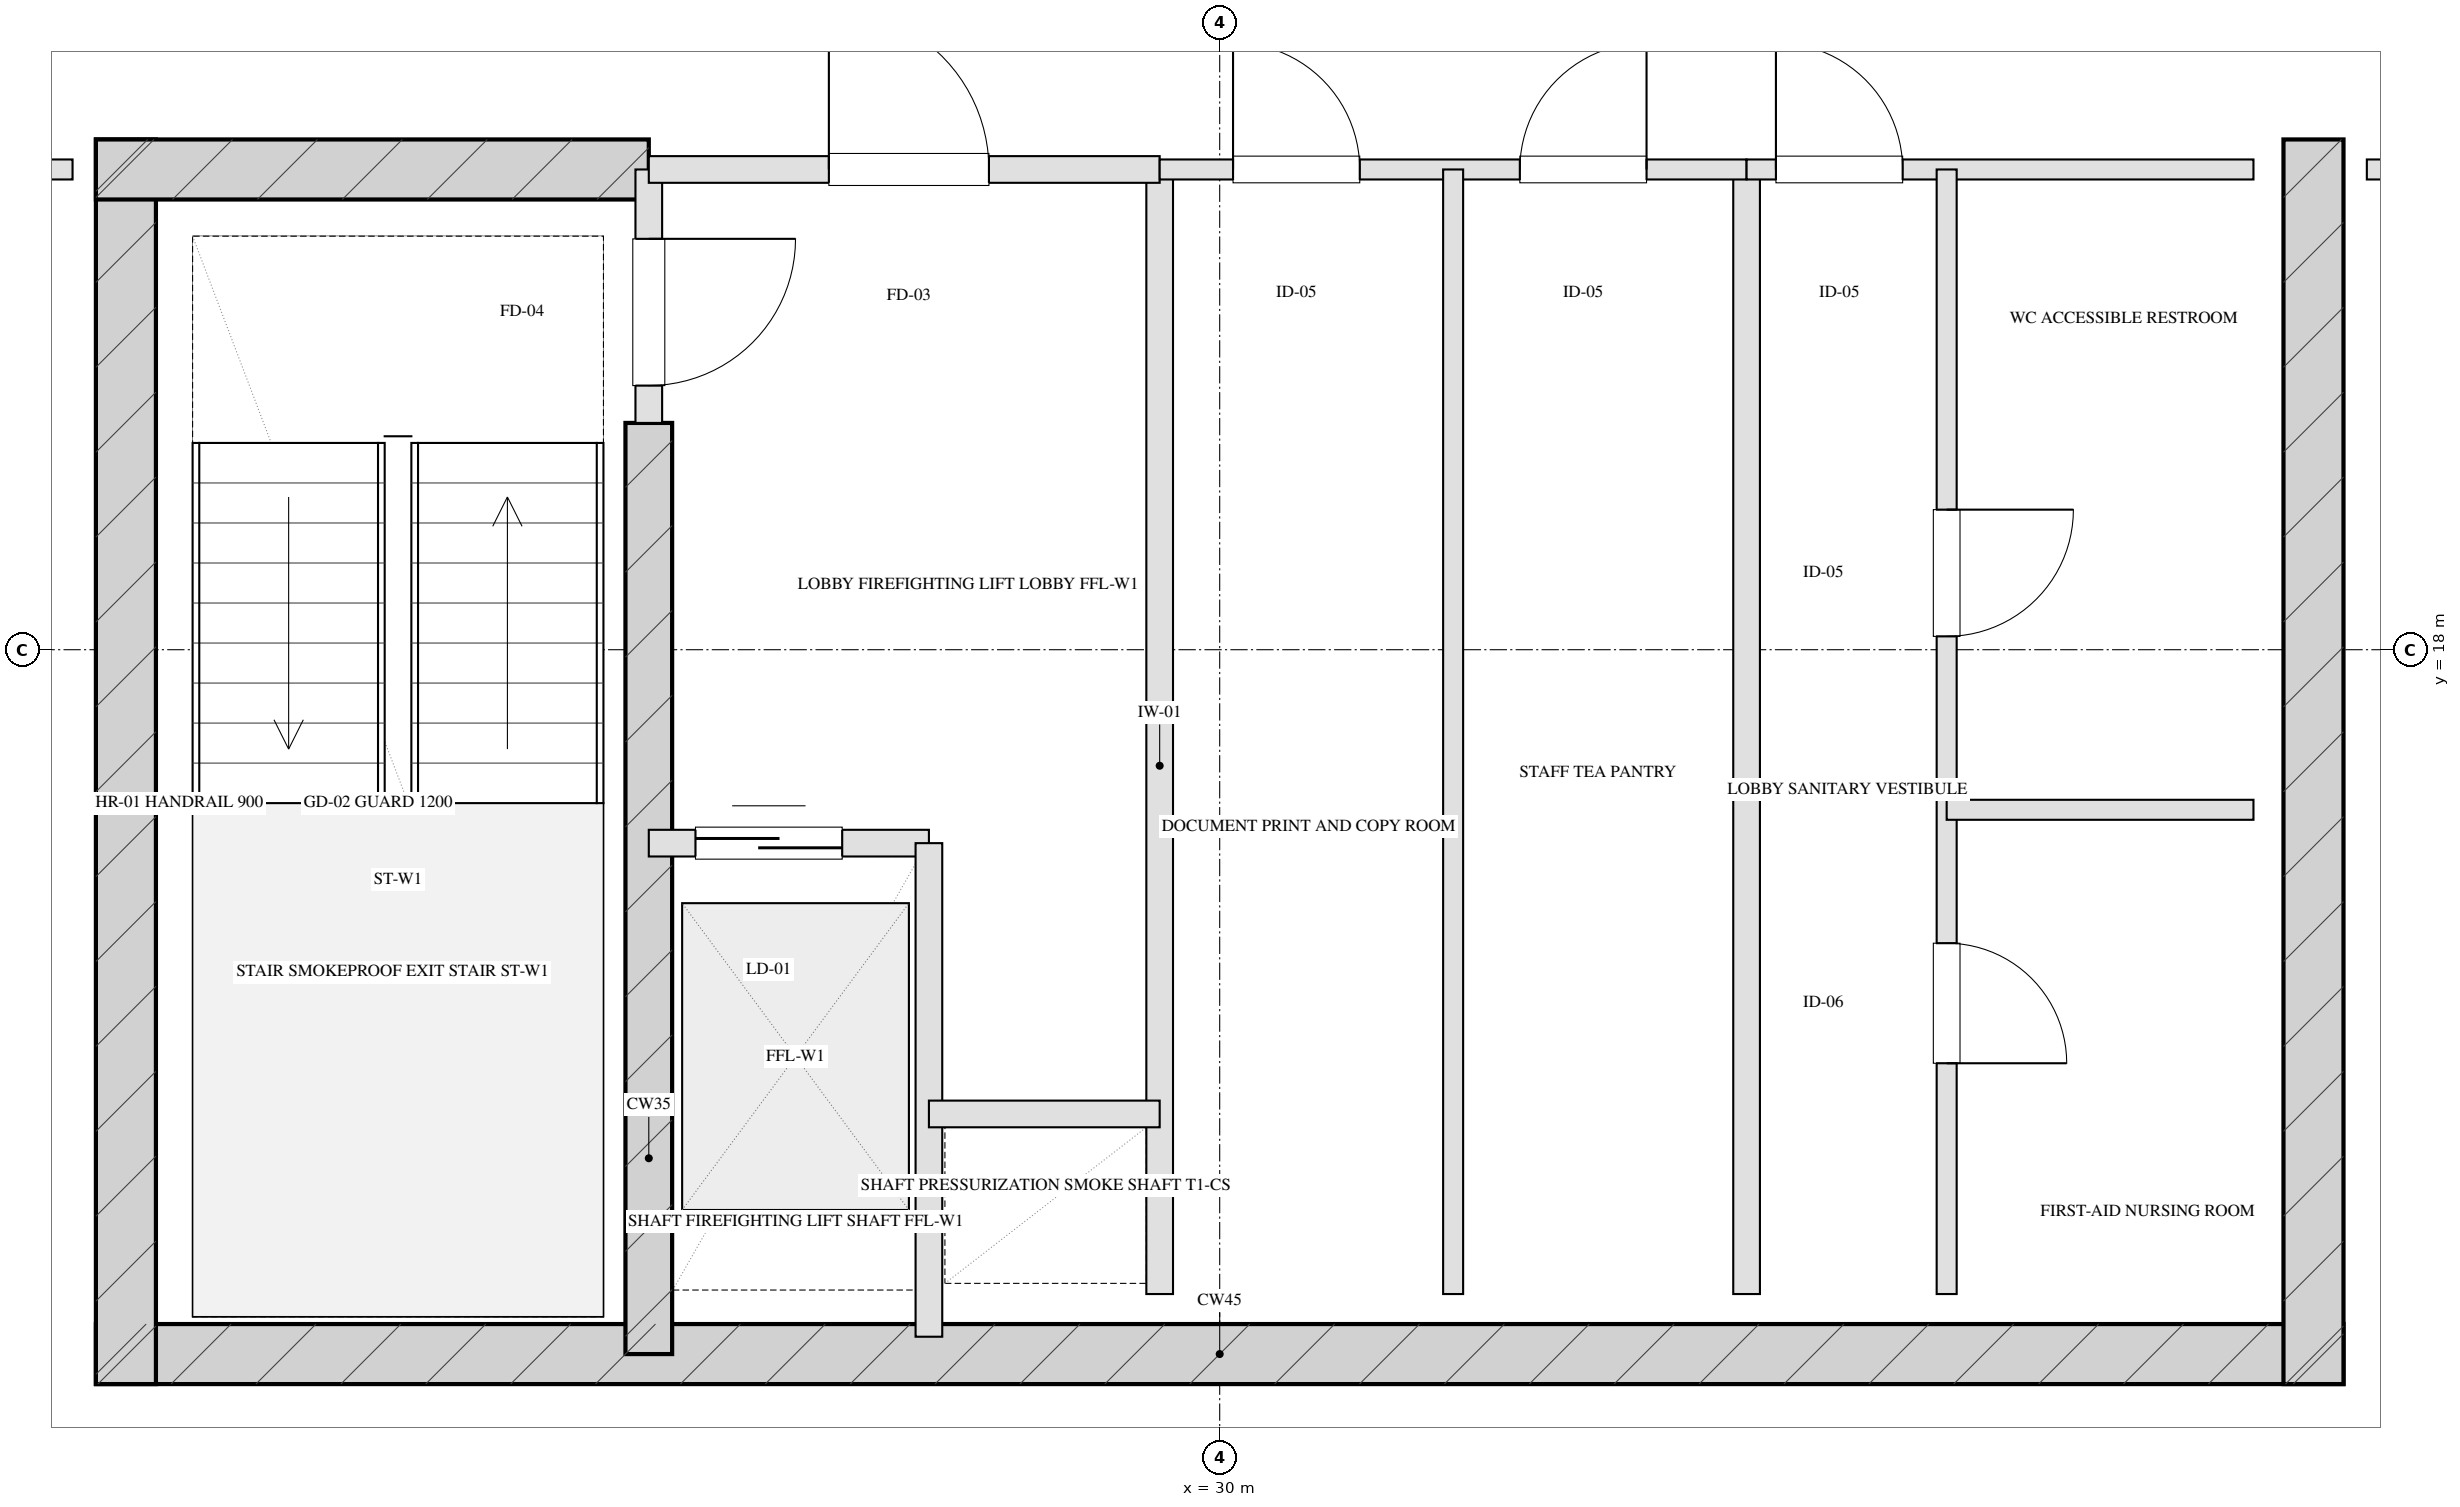
"""IFC4 building model, lengths in metres.
Left out: names, types, materials, properties, quantities, classifications, styles, units other than length and angle.
Written with IfcOpenShell. Run it as: python <this file> out.ifc"""

import sys

from ifc_helpers import new_model, si_unit, direction, frame, frame_2d, origin, place, context, subcontext, project, spatial, rectangle, extrude, element, fill, save


model = new_model("IFC4")
c1 = context("Model", 3, precision=1e-05, world=origin(), true_north=direction((0.0, 1.0)))
c2 = subcontext(c1, "Body", "Model", "MODEL_VIEW")
j1 = project(units=[si_unit("LENGTHUNIT", "METRE"), si_unit("PLANEANGLEUNIT", "RADIAN")], contexts=[c1])
p1 = place(None, origin())
s1 = spatial("IfcSite", under=j1, at=p1, CompositionType="ELEMENT")
p2 = place(p1, origin())
s2 = spatial("IfcBuilding", under=s1, at=p2, CompositionType="ELEMENT")
p3 = place(p2, frame((0.0, 0.0, 216.2)))
s3 = spatial("IfcBuildingStorey", under=s2, at=p3, CompositionType="ELEMENT", Elevation=216.2)
p4 = place(p3, frame((21.575, 12.72, 0.0), z_axis=(0.0, 0.0, 1.0), x_axis=(1.0, 0.0, 0.0)))
e1 = element("IfcWall", 1, at=p4, inside=s3, PredefinedType="SHEAR", context=c2, shape_type="SweptSolid", body=[
    extrude(rectangle(XDim=16.85, YDim=0.45, at=frame_2d((8.425, 0.0))), origin(), (0.0, 0.0, 1.0), 3.45),
])
for number, where, z_axis, x_axis in (
    (2, (21.8, 21.825, 0.0), (0.0, 0.0, 1.0), (0.0, -1.0, 0.0)),
    (3, (38.2, 21.825, 0.0), (0.0, 0.0, 1.0), (0.0, -1.0, 0.0)),
):
    element("IfcWall", number, at=place(p3, frame(where, z_axis=z_axis, x_axis=x_axis)), inside=s3, PredefinedType="SHEAR", context=c2, shape_type="SweptSolid", body=[
        extrude(rectangle(XDim=9.33, YDim=0.45, at=frame_2d((4.665, 0.0))), origin(), (0.0, 0.0, 1.0), 3.45),
    ])
p5 = place(p3, frame((25.72, 19.7, 0.0), z_axis=(0.0, 0.0, 1.0), x_axis=(0.0, -1.0, 0.0)))
e4 = element("IfcWall", 4, at=p5, inside=s3, PredefinedType="SHEAR", context=c2, shape_type="SweptSolid", body=[
    extrude(rectangle(XDim=6.98, YDim=0.35, at=frame_2d((3.49, 0.0))), origin(), (0.0, 0.0, 1.0), 3.45),
])
p6 = place(p3, frame((21.575, 21.6, 0.0), z_axis=(0.0, 0.0, 1.0), x_axis=(1.0, 0.0, 0.0)))
e5 = element("IfcWall", 5, at=p6, inside=s3, PredefinedType="SHEAR", context=c2, shape_type="SweptSolid", body=[
    extrude(rectangle(XDim=4.145, YDim=0.45, at=frame_2d((2.073, 0.0))), origin(), (0.0, 0.0, 1.0), 3.45),
])
p7 = place(p3, frame((25.72, 21.6, 0.0), z_axis=(0.0, 0.0, 1.0), x_axis=(0.0, -1.0, 0.0)))
e6 = element("IfcWall", 6, at=p7, inside=s3, PredefinedType="PARTITIONING", context=c2, shape_type="SweptSolid", body=[
    extrude(rectangle(XDim=1.9, YDim=0.2, at=frame_2d((0.95, 0.0))), origin(), (0.0, 0.0, 1.0), 3.155),
])
p8 = place(p7, frame((0.52, 0.0, 0.0)))
e7 = element("IfcOpeningElement", 7, at=p8, cuts=e6, PredefinedType="OPENING", context=c2, shape_type="SweptSolid", body=[
    extrude(rectangle(XDim=1.1, YDim=2.05, at=frame_2d((0.55, 1.025))), frame((0.0, 0.11, 0.0), z_axis=(0.0, -1.0, 0.0), x_axis=(1.0, 0.0, 0.0)), (0.0, 0.0, 1.0), 0.22),
])
p9 = place(p3, frame((29.55, 21.6, 0.0), z_axis=(0.0, 0.0, 1.0), x_axis=(0.0, -1.0, 0.0)))
e8 = element("IfcWall", 8, at=p9, inside=s3, PredefinedType="PARTITIONING", context=c2, shape_type="SweptSolid", body=[
    extrude(rectangle(XDim=8.43, YDim=0.2, at=frame_2d((4.215, 0.0))), origin(), (0.0, 0.0, 1.0), 3.155),
])
p10 = place(p3, frame((25.72, 21.6, 0.0), z_axis=(0.0, 0.0, 1.0), x_axis=(1.0, 0.0, 0.0)))
e9 = element("IfcWall", 9, at=p10, inside=s3, PredefinedType="PARTITIONING", context=c2, shape_type="SweptSolid", body=[
    extrude(rectangle(XDim=3.83, YDim=0.2, at=frame_2d((1.915, 0.0))), origin(), (0.0, 0.0, 1.0), 3.155),
])
p11 = place(p10, frame((1.35, 0.0, 0.0)))
e10 = element("IfcOpeningElement", 10, at=p11, cuts=e9, PredefinedType="OPENING", context=c2, shape_type="SweptSolid", body=[
    extrude(rectangle(XDim=1.2, YDim=2.05, at=frame_2d((0.6, 1.025))), frame((0.0, 0.11, 0.0), z_axis=(0.0, -1.0, 0.0), x_axis=(1.0, 0.0, 0.0)), (0.0, 0.0, 1.0), 0.22),
])
p12 = place(p3, frame((25.72, 16.55, 0.0), z_axis=(0.0, 0.0, 1.0), x_axis=(1.0, 0.0, 0.0)))
e11 = element("IfcWall", 11, at=p12, inside=s3, PredefinedType="PARTITIONING", context=c2, shape_type="SweptSolid", body=[
    extrude(rectangle(XDim=2.1, YDim=0.2, at=frame_2d((1.05, 0.0))), origin(), (0.0, 0.0, 1.0), 3.155),
])
p13 = place(p12, frame((0.35, 0.0, 0.0)))
e12 = element("IfcOpeningElement", 12, at=p13, cuts=e11, PredefinedType="OPENING", context=c2, shape_type="SweptSolid", body=[
    extrude(rectangle(XDim=1.1, YDim=2.05, at=frame_2d((0.55, 1.025))), frame((0.0, 0.11, 0.0), z_axis=(0.0, -1.0, 0.0), x_axis=(1.0, 0.0, 0.0)), (0.0, 0.0, 1.0), 0.22),
])
p14 = place(p3, frame((27.82, 16.55, 0.0), z_axis=(0.0, 0.0, 1.0), x_axis=(0.0, -1.0, 0.0)))
e13 = element("IfcWall", 13, at=p14, inside=s3, PredefinedType="PARTITIONING", context=c2, shape_type="SweptSolid", body=[
    extrude(rectangle(XDim=3.7, YDim=0.2, at=frame_2d((1.85, 0.0))), origin(), (0.0, 0.0, 1.0), 3.155),
])
p15 = place(p3, frame((27.82, 14.52, 0.0), z_axis=(0.0, 0.0, 1.0), x_axis=(1.0, 0.0, 0.0)))
e14 = element("IfcWall", 14, at=p15, inside=s3, PredefinedType="PARTITIONING", context=c2, shape_type="SweptSolid", body=[
    extrude(rectangle(XDim=1.73, YDim=0.2, at=frame_2d((0.865, 0.0))), origin(), (0.0, 0.0, 1.0), 3.155),
])
p16 = place(p3, frame((33.95, 21.6, 0.0), z_axis=(0.0, 0.0, 1.0), x_axis=(0.0, -1.0, 0.0)))
e15 = element("IfcWall", 15, at=p16, inside=s3, PredefinedType="PARTITIONING", context=c2, shape_type="SweptSolid", body=[
    extrude(rectangle(XDim=8.43, YDim=0.2, at=frame_2d((4.215, 0.0))), origin(), (0.0, 0.0, 1.0), 3.155),
])
p17 = place(p3, frame((29.55, 21.6, 0.0), z_axis=(0.0, 0.0, 1.0), x_axis=(1.0, 0.0, 0.0)))
e16 = element("IfcWall", 16, at=p17, inside=s3, PredefinedType="PARTITIONING", context=c2, shape_type="SweptSolid", body=[
    extrude(rectangle(XDim=4.4, YDim=0.15, at=frame_2d((2.2, 0.0))), origin(), (0.0, 0.0, 1.0), 3.155),
])
p18 = place(p17, frame((0.55, 0.0, 0.0)))
e17 = element("IfcOpeningElement", 17, at=p18, cuts=e16, PredefinedType="OPENING", context=c2, shape_type="SweptSolid", body=[
    extrude(rectangle(XDim=0.95, YDim=2.05, at=frame_2d((0.475, 1.025))), frame((0.0, 0.085, 0.0), z_axis=(0.0, -1.0, 0.0), x_axis=(1.0, 0.0, 0.0)), (0.0, 0.0, 1.0), 0.17),
])
p19 = place(p17, frame((2.7, 0.0, 0.0)))
e18 = element("IfcOpeningElement", 18, at=p19, cuts=e16, PredefinedType="OPENING", context=c2, shape_type="SweptSolid", body=[
    extrude(rectangle(XDim=0.95, YDim=2.05, at=frame_2d((0.475, 1.025))), frame((0.0, 0.085, 0.0), z_axis=(0.0, -1.0, 0.0), x_axis=(1.0, 0.0, 0.0)), (0.0, 0.0, 1.0), 0.17),
])
p20 = place(p3, frame((31.75, 21.6, 0.0), z_axis=(0.0, 0.0, 1.0), x_axis=(0.0, -1.0, 0.0)))
e19 = element("IfcWall", 19, at=p20, inside=s3, PredefinedType="PARTITIONING", context=c2, shape_type="SweptSolid", body=[
    extrude(rectangle(XDim=8.43, YDim=0.15, at=frame_2d((4.215, 0.0))), origin(), (0.0, 0.0, 1.0), 3.155),
])
p21 = place(p3, frame((33.95, 21.6, 0.0), z_axis=(0.0, 0.0, 1.0), x_axis=(1.0, 0.0, 0.0)))
e20 = element("IfcWall", 20, at=p21, inside=s3, PredefinedType="PARTITIONING", context=c2, shape_type="SweptSolid", body=[
    extrude(rectangle(XDim=3.8, YDim=0.15, at=frame_2d((1.9, 0.0))), origin(), (0.0, 0.0, 1.0), 3.155),
])
p22 = place(p21, frame((0.22, 0.0, 0.0)))
e21 = element("IfcOpeningElement", 21, at=p22, cuts=e20, PredefinedType="OPENING", context=c2, shape_type="SweptSolid", body=[
    extrude(rectangle(XDim=0.95, YDim=2.05, at=frame_2d((0.475, 1.025))), frame((0.0, 0.085, 0.0), z_axis=(0.0, -1.0, 0.0), x_axis=(1.0, 0.0, 0.0)), (0.0, 0.0, 1.0), 0.17),
])
p23 = place(p3, frame((35.45, 21.6, 0.0), z_axis=(0.0, 0.0, 1.0), x_axis=(0.0, -1.0, 0.0)))
e22 = element("IfcWall", 22, at=p23, inside=s3, PredefinedType="PARTITIONING", context=c2, shape_type="SweptSolid", body=[
    extrude(rectangle(XDim=8.43, YDim=0.15, at=frame_2d((4.215, 0.0))), origin(), (0.0, 0.0, 1.0), 2.745),
])
p24 = place(p23, frame((2.55, 0.0, 0.0)))
e23 = element("IfcOpeningElement", 23, at=p24, cuts=e22, PredefinedType="OPENING", context=c2, shape_type="SweptSolid", body=[
    extrude(rectangle(XDim=0.95, YDim=2.05, at=frame_2d((0.475, 1.025))), frame((0.0, 0.085, 0.0), z_axis=(0.0, -1.0, 0.0), x_axis=(1.0, 0.0, 0.0)), (0.0, 0.0, 1.0), 0.17),
])
p25 = place(p23, frame((5.8, 0.0, 0.0)))
e24 = element("IfcOpeningElement", 24, at=p25, cuts=e22, PredefinedType="OPENING", context=c2, shape_type="SweptSolid", body=[
    extrude(rectangle(XDim=0.9, YDim=2.05, at=frame_2d((0.45, 1.025))), frame((0.0, 0.085, 0.0), z_axis=(0.0, -1.0, 0.0), x_axis=(1.0, 0.0, 0.0)), (0.0, 0.0, 1.0), 0.17),
])
p26 = place(p3, frame((35.45, 16.8, 0.0), z_axis=(0.0, 0.0, 1.0), x_axis=(1.0, 0.0, 0.0)))
e25 = element("IfcWall", 25, at=p26, inside=s3, PredefinedType="PARTITIONING", context=c2, shape_type="SweptSolid", body=[
    extrude(rectangle(XDim=2.3, YDim=0.15, at=frame_2d((1.15, 0.0))), origin(), (0.0, 0.0, 1.0), 3.155),
])
p27 = place(p3, frame((13.2, 21.6, 0.0), z_axis=(0.0, 0.0, 1.0), x_axis=(1.0, 0.0, 0.0)))
e26 = element("IfcWall", 26, at=p27, inside=s3, PredefinedType="PARTITIONING", context=c2, shape_type="SweptSolid", body=[
    extrude(rectangle(XDim=8.2, YDim=0.15, at=frame_2d((4.1, 0.0))), origin(), (0.0, 0.0, 1.0), 3.155),
])
p28 = place(p27, frame((3.444, 0.0, 0.0)))
e27 = element("IfcOpeningElement", 27, at=p28, cuts=e26, PredefinedType="OPENING", context=c2, shape_type="SweptSolid", body=[
    extrude(rectangle(XDim=1.0, YDim=2.05, at=frame_2d((0.5, 1.025))), frame((0.0, 0.085, 0.0), z_axis=(0.0, -1.0, 0.0), x_axis=(1.0, 0.0, 0.0)), (0.0, 0.0, 1.0), 0.17),
])
p29 = place(p3, frame((38.6, 21.6, 0.0), z_axis=(0.0, 0.0, 1.0), x_axis=(1.0, 0.0, 0.0)))
e28 = element("IfcWall", 28, at=p29, inside=s3, PredefinedType="PARTITIONING", context=c2, shape_type="SweptSolid", body=[
    extrude(rectangle(XDim=8.2, YDim=0.15, at=frame_2d((4.1, 0.0))), origin(), (0.0, 0.0, 1.0), 3.155),
])
p30 = place(p29, frame((3.444, 0.0, 0.0)))
e29 = element("IfcOpeningElement", 29, at=p30, cuts=e28, PredefinedType="OPENING", context=c2, shape_type="SweptSolid", body=[
    extrude(rectangle(XDim=1.0, YDim=2.05, at=frame_2d((0.5, 1.025))), frame((0.0, 0.085, 0.0), z_axis=(0.0, -1.0, 0.0), x_axis=(1.0, 0.0, 0.0)), (0.0, 0.0, 1.0), 0.17),
])
p31 = place(p8, origin())
e30 = element("IfcDoor", 30, at=p31, inside=s3, OperationType="SINGLE_SWING_LEFT", PredefinedType="DOOR", context=c2, shape_type="SweptSolid", body=[
    extrude(rectangle(XDim=1.1, YDim=2.05, at=frame_2d((0.55, 1.025))), frame((0.0, 0.025, 0.0), z_axis=(0.0, -1.0, 0.0), x_axis=(1.0, 0.0, 0.0)), (0.0, 0.0, 1.0), 0.05),
])
fill(e7, e30)
p32 = place(p11, origin())
e31 = element("IfcDoor", 31, at=p32, inside=s3, OperationType="SINGLE_SWING_LEFT", PredefinedType="DOOR", context=c2, shape_type="SweptSolid", body=[
    extrude(rectangle(XDim=1.2, YDim=2.05, at=frame_2d((0.6, 1.025))), frame((0.0, 0.025, 0.0), z_axis=(0.0, -1.0, 0.0), x_axis=(1.0, 0.0, 0.0)), (0.0, 0.0, 1.0), 0.05),
])
fill(e10, e31)
p33 = place(p13, origin())
e32 = element("IfcDoor", 32, at=p33, inside=s3, OperationType="DOUBLE_DOOR_SLIDING", PredefinedType="DOOR", context=c2, shape_type="SweptSolid", body=[
    extrude(rectangle(XDim=1.1, YDim=2.05, at=frame_2d((0.55, 1.025))), frame((0.0, 0.025, 0.0), z_axis=(0.0, -1.0, 0.0), x_axis=(1.0, 0.0, 0.0)), (0.0, 0.0, 1.0), 0.05),
])
fill(e12, e32)
p34 = place(p18, origin())
e33 = element("IfcDoor", 33, at=p34, inside=s3, OperationType="SINGLE_SWING_LEFT", PredefinedType="DOOR", context=c2, shape_type="SweptSolid", body=[
    extrude(rectangle(XDim=0.95, YDim=2.05, at=frame_2d((0.475, 1.025))), frame((0.0, 0.025, 0.0), z_axis=(0.0, -1.0, 0.0), x_axis=(1.0, 0.0, 0.0)), (0.0, 0.0, 1.0), 0.05),
])
fill(e17, e33)
p35 = place(p19, origin())
e34 = element("IfcDoor", 34, at=p35, inside=s3, OperationType="SINGLE_SWING_RIGHT", PredefinedType="DOOR", context=c2, shape_type="SweptSolid", body=[
    extrude(rectangle(XDim=0.95, YDim=2.05, at=frame_2d((0.475, 1.025))), frame((0.0, 0.025, 0.0), z_axis=(0.0, -1.0, 0.0), x_axis=(1.0, 0.0, 0.0)), (0.0, 0.0, 1.0), 0.05),
])
fill(e18, e34)
p36 = place(p22, origin())
e35 = element("IfcDoor", 35, at=p36, inside=s3, OperationType="SINGLE_SWING_LEFT", PredefinedType="DOOR", context=c2, shape_type="SweptSolid", body=[
    extrude(rectangle(XDim=0.95, YDim=2.05, at=frame_2d((0.475, 1.025))), frame((0.0, 0.025, 0.0), z_axis=(0.0, -1.0, 0.0), x_axis=(1.0, 0.0, 0.0)), (0.0, 0.0, 1.0), 0.05),
])
fill(e21, e35)
p37 = place(p24, origin())
e36 = element("IfcDoor", 36, at=p37, inside=s3, OperationType="SINGLE_SWING_LEFT", PredefinedType="DOOR", context=c2, shape_type="SweptSolid", body=[
    extrude(rectangle(XDim=0.95, YDim=2.05, at=frame_2d((0.475, 1.025))), frame((0.0, 0.025, 0.0), z_axis=(0.0, -1.0, 0.0), x_axis=(1.0, 0.0, 0.0)), (0.0, 0.0, 1.0), 0.05),
])
fill(e23, e36)
p38 = place(p25, origin())
e37 = element("IfcDoor", 37, at=p38, inside=s3, OperationType="SINGLE_SWING_RIGHT", PredefinedType="DOOR", context=c2, shape_type="SweptSolid", body=[
    extrude(rectangle(XDim=0.9, YDim=2.05, at=frame_2d((0.45, 1.025))), frame((0.0, 0.025, 0.0), z_axis=(0.0, -1.0, 0.0), x_axis=(1.0, 0.0, 0.0)), (0.0, 0.0, 1.0), 0.05),
])
fill(e24, e37)
save(model, sys.argv[1])
